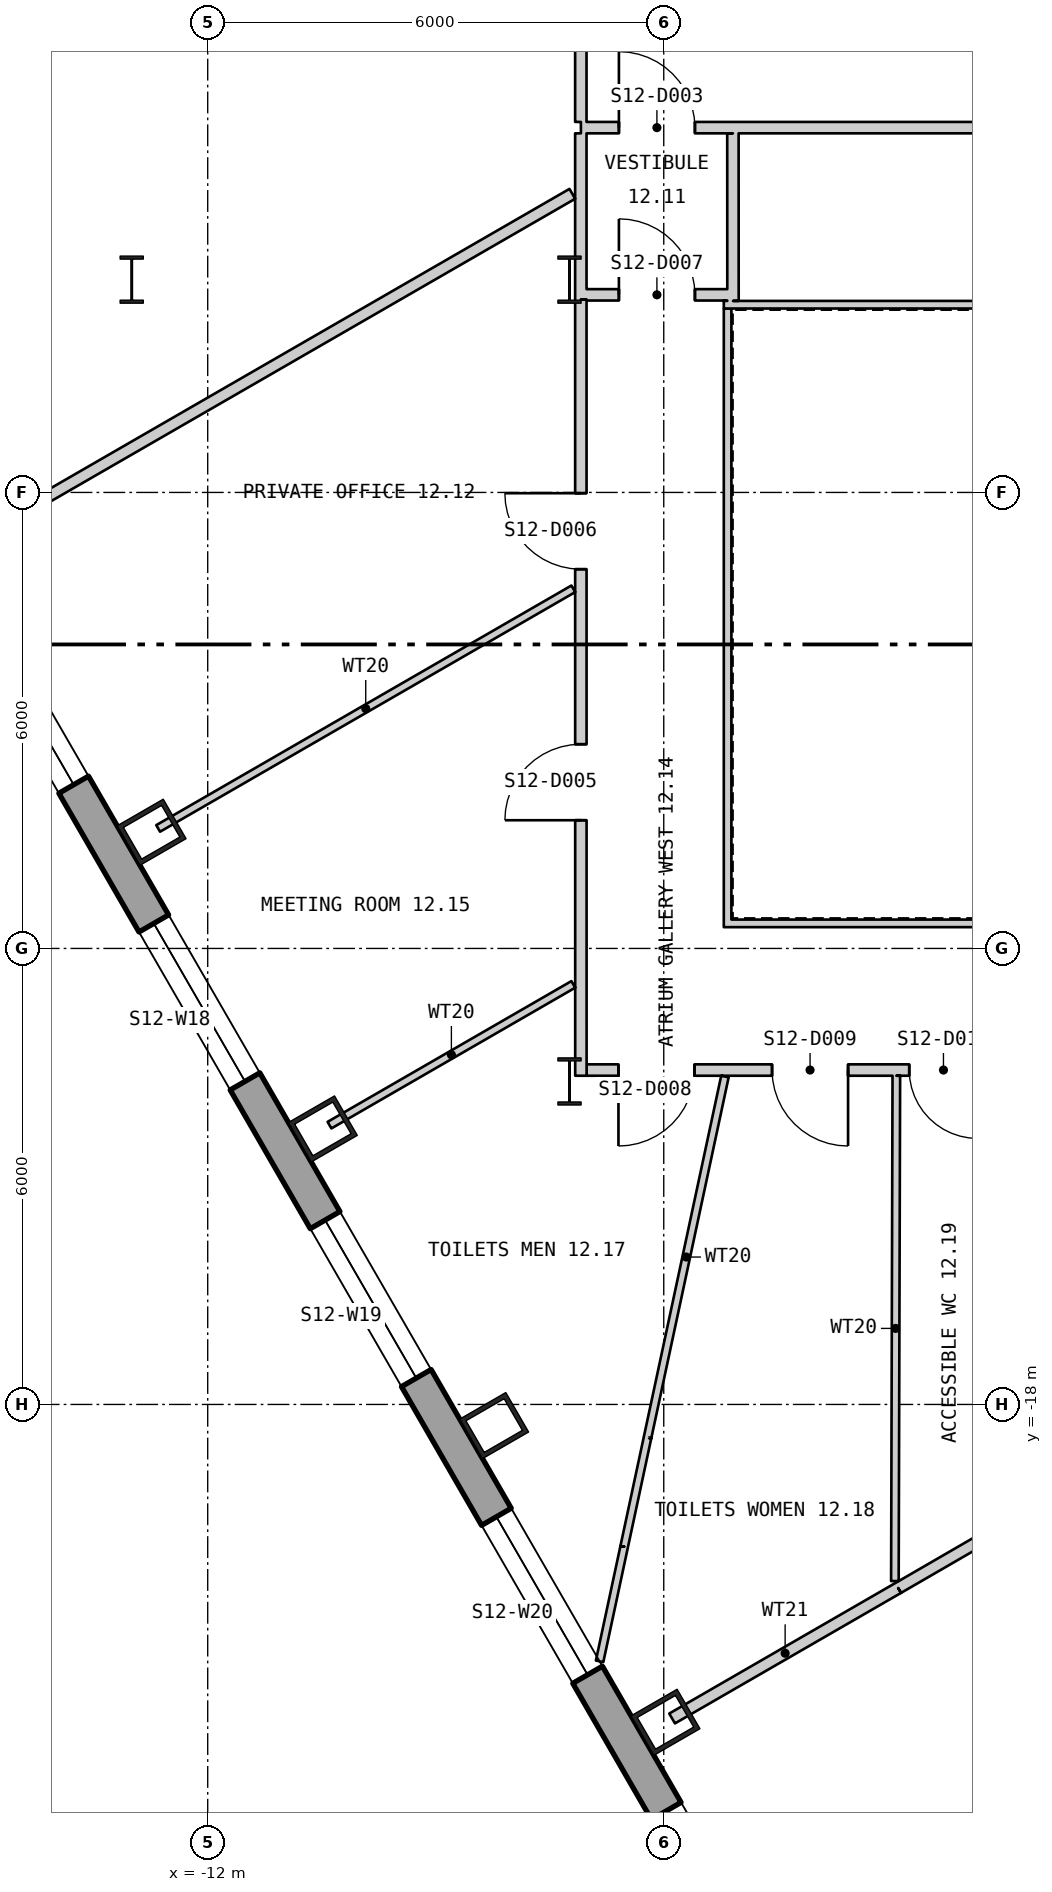
"""IFC4 building model, lengths in metres.
Left out: names, types, materials, properties, quantities, classifications, styles, units other than length and angle.
Written with IfcOpenShell. Run it as: python <this file> out.ifc"""

import sys

from ifc_helpers import new_model, si_unit, direction, frame, frame_2d, origin, origin_2d, place, context, subcontext, project, spatial, polyline, rectangle, hollow_rectangle, i_section, outline, extrude, element, fill, save


model = new_model("IFC4")
c1 = context("Model", 3, precision=1e-05, world=origin(), true_north=direction((0.0, 1.0)))
c2 = subcontext(c1, "Body", "Model", "MODEL_VIEW")
j1 = project(units=[si_unit("LENGTHUNIT", "METRE"), si_unit("PLANEANGLEUNIT", "RADIAN")], contexts=[c1])
p1 = place(None, origin())
s1 = spatial("IfcSite", under=j1, at=p1, CompositionType="ELEMENT")
p2 = place(p1, origin())
s2 = spatial("IfcBuilding", under=s1, at=p2, CompositionType="ELEMENT")
p3 = place(p2, frame((0.0, 0.0, 163.2)))
s3 = spatial("IfcBuildingStorey", under=s2, at=p3, CompositionType="ELEMENT", Elevation=163.2)
for number, where, z_axis, x_axis in (
    (1, (-12.738, -10.471, 0.0), (0.0, 0.0, 1.0), (0.5, -0.866, 0.0)),
    (2, (-10.485, -14.375, 0.0), (0.0, 0.0, 1.0), (0.5, -0.866, 0.0)),
    (3, (-8.231, -18.278, 0.0), (0.0, 0.0, 1.0), (0.5, -0.866, 0.0)),
    (4, (-5.977, -22.182, 0.0), (0.0, 0.0, 1.0), (0.5, -0.866, 0.0)),
):
    element("IfcColumn", number, at=place(p3, frame(where, z_axis=z_axis, x_axis=x_axis)), inside=s3, PredefinedType="COLUMN", context=c2, shape_type="SweptSolid", body=[
        extrude(hollow_rectangle(XDim=0.6, YDim=0.7, WallThickness=0.06, at=origin_2d()), origin(), (0.0, 0.0, 1.0), 3.9),
    ])
for number, where, z_axis, x_axis in (
    (5, (-7.24, -3.2, 0.0), (0.0, 0.0, 1.0), (1.0, 0.0, 0.0)),
    (6, (-7.24, -13.75, 0.0), (0.0, 0.0, 1.0), (1.0, 0.0, 0.0)),
    (7, (-13.0, -3.2, 0.0), (0.0, 0.0, 1.0), (1.0, 0.0, 0.0)),
):
    element("IfcColumn", number, at=place(p3, frame(where, z_axis=z_axis, x_axis=x_axis)), inside=s3, PredefinedType="COLUMN", context=c2, shape_type="SweptSolid", body=[
        extrude(i_section(OverallWidth=0.305, OverallDepth=0.62, WebThickness=0.021, FlangeThickness=0.04, at=origin_2d()), origin(), (0.0, 0.0, 1.0), 3.9),
    ])
p4 = place(p3, frame((-26.925, 12.951, -0.18), z_axis=(0.0, 0.0, 1.0), x_axis=(0.499999764979, -0.866025539474, 0.0)))
e8 = element("IfcWall", 8, at=p4, inside=s3, PredefinedType="SOLIDWALL", context=c2, shape_type="SweptSolid", body=[
    extrude(outline(polyline([(-0.13, -0.225), (45.87, -0.225), (45.61, 0.225), (0.13, 0.225), (-0.13, -0.225)])), origin(), (0.0, 0.0, 1.0), 3.68),
])
p5 = place(p4, frame((1.424, 0.0, 1.08)))
e9 = element("IfcOpeningElement", 9, at=p5, cuts=e8, PredefinedType="OPENING", context=c2, shape_type="SweptSolid", body=[
    extrude(rectangle(XDim=2.4, YDim=2.0, at=frame_2d((1.2, 1.0))), frame((0.0, 0.235, 0.0), z_axis=(0.0, -1.0, 0.0), x_axis=(1.0, 0.0, 0.0)), (0.0, 0.0, 1.0), 0.47),
])
p6 = place(p4, frame((5.893, 0.0, 1.08)))
e10 = element("IfcOpeningElement", 10, at=p6, cuts=e8, PredefinedType="OPENING", context=c2, shape_type="SweptSolid", body=[
    extrude(rectangle(XDim=2.4, YDim=2.0, at=frame_2d((1.2, 1.0))), frame((0.0, 0.235, 0.0), z_axis=(0.0, -1.0, 0.0), x_axis=(1.0, 0.0, 0.0)), (0.0, 0.0, 1.0), 0.47),
])
p7 = place(p4, frame((10.401, 0.0, 1.08)))
e11 = element("IfcOpeningElement", 11, at=p7, cuts=e8, PredefinedType="OPENING", context=c2, shape_type="SweptSolid", body=[
    extrude(rectangle(XDim=2.4, YDim=2.0, at=frame_2d((1.2, 1.0))), frame((0.0, 0.235, 0.0), z_axis=(0.0, -1.0, 0.0), x_axis=(1.0, 0.0, 0.0)), (0.0, 0.0, 1.0), 0.47),
])
p8 = place(p4, frame((14.909, 0.0, 1.08)))
e12 = element("IfcOpeningElement", 12, at=p8, cuts=e8, PredefinedType="OPENING", context=c2, shape_type="SweptSolid", body=[
    extrude(rectangle(XDim=2.4, YDim=2.0, at=frame_2d((1.2, 1.0))), frame((0.0, 0.235, 0.0), z_axis=(0.0, -1.0, 0.0), x_axis=(1.0, 0.0, 0.0)), (0.0, 0.0, 1.0), 0.47),
])
p9 = place(p4, frame((19.416, 0.0, 1.08)))
e13 = element("IfcOpeningElement", 13, at=p9, cuts=e8, PredefinedType="OPENING", context=c2, shape_type="SweptSolid", body=[
    extrude(rectangle(XDim=2.4, YDim=2.0, at=frame_2d((1.2, 1.0))), frame((0.0, 0.235, 0.0), z_axis=(0.0, -1.0, 0.0), x_axis=(1.0, 0.0, 0.0)), (0.0, 0.0, 1.0), 0.47),
])
p10 = place(p4, frame((23.924, 0.0, 1.08)))
e14 = element("IfcOpeningElement", 14, at=p10, cuts=e8, PredefinedType="OPENING", context=c2, shape_type="SweptSolid", body=[
    extrude(rectangle(XDim=2.4, YDim=2.0, at=frame_2d((1.2, 1.0))), frame((0.0, 0.235, 0.0), z_axis=(0.0, -1.0, 0.0), x_axis=(1.0, 0.0, 0.0)), (0.0, 0.0, 1.0), 0.47),
])
p11 = place(p4, frame((28.431, 0.0, 1.08)))
e15 = element("IfcOpeningElement", 15, at=p11, cuts=e8, PredefinedType="OPENING", context=c2, shape_type="SweptSolid", body=[
    extrude(rectangle(XDim=2.4, YDim=2.0, at=frame_2d((1.2, 1.0))), frame((0.0, 0.235, 0.0), z_axis=(0.0, -1.0, 0.0), x_axis=(1.0, 0.0, 0.0)), (0.0, 0.0, 1.0), 0.47),
])
p12 = place(p4, frame((32.939, 0.0, 1.08)))
e16 = element("IfcOpeningElement", 16, at=p12, cuts=e8, PredefinedType="OPENING", context=c2, shape_type="SweptSolid", body=[
    extrude(rectangle(XDim=2.4, YDim=2.0, at=frame_2d((1.2, 1.0))), frame((0.0, 0.235, 0.0), z_axis=(0.0, -1.0, 0.0), x_axis=(1.0, 0.0, 0.0)), (0.0, 0.0, 1.0), 0.47),
])
p13 = place(p4, frame((37.447, 0.0, 1.08)))
e17 = element("IfcOpeningElement", 17, at=p13, cuts=e8, PredefinedType="OPENING", context=c2, shape_type="SweptSolid", body=[
    extrude(rectangle(XDim=2.4, YDim=2.0, at=frame_2d((1.2, 1.0))), frame((0.0, 0.235, 0.0), z_axis=(0.0, -1.0, 0.0), x_axis=(1.0, 0.0, 0.0)), (0.0, 0.0, 1.0), 0.47),
])
p14 = place(p4, frame((41.916, 0.0, 1.08)))
e18 = element("IfcOpeningElement", 18, at=p14, cuts=e8, PredefinedType="OPENING", context=c2, shape_type="SweptSolid", body=[
    extrude(rectangle(XDim=2.4, YDim=2.0, at=frame_2d((1.2, 1.0))), frame((0.0, 0.235, 0.0), z_axis=(0.0, -1.0, 0.0), x_axis=(1.0, 0.0, 0.0)), (0.0, 0.0, 1.0), 0.47),
])
for number, where, z_axis, x_axis in (
    (19, (-5.21, -11.67, 0.0), (0.0, 0.0, 1.0), (1.0, 0.0, 0.0)),
    (20, (5.21, -3.53, 0.0), (0.0, 0.0, 1.0), (-1.0, 0.0, 0.0)),
):
    element("IfcWall", number, at=place(p3, frame(where, z_axis=z_axis, x_axis=x_axis)), inside=s3, PredefinedType="PARTITIONING", context=c2, shape_type="SweptSolid", body=[
        extrude(rectangle(XDim=10.42, YDim=0.1, at=frame_2d((5.21, 0.0))), origin(), (0.0, 0.0, 1.0), 3.7),
    ])
p15 = place(p3, frame((-5.16, -3.58, 0.0), z_axis=(0.0, 0.0, 1.0), x_axis=(0.0, -1.0, 0.0)))
e21 = element("IfcWall", 21, at=p15, inside=s3, PredefinedType="PARTITIONING", context=c2, shape_type="SweptSolid", body=[
    extrude(rectangle(XDim=8.04, YDim=0.1, at=frame_2d((4.02, 0.0))), origin(), (0.0, 0.0, 1.0), 3.7),
])
p16 = place(p3, frame((-14.906, -6.516, 0.0), z_axis=(0.0, 0.0, 1.0), x_axis=(0.866138783521, 0.499803569096, 0.0)))
e22 = element("IfcWall", 22, at=p16, inside=s3, PredefinedType="PARTITIONING", context=c2, shape_type="SweptSolid", body=[
    extrude(rectangle(XDim=8.893, YDim=0.15, at=frame_2d((4.447, 0.0))), origin(), (0.0, 0.0, 1.0), 3.7),
])
p17 = place(p3, frame((-12.652, -10.421, 0.0), z_axis=(0.0, 0.0, 1.0), x_axis=(0.866058850386, 0.499942064311, 0.0)))
e23 = element("IfcWall", 23, at=p17, inside=s3, PredefinedType="PARTITIONING", context=c2, shape_type="SweptSolid", body=[
    extrude(rectangle(XDim=6.307, YDim=0.1, at=frame_2d((3.153, 0.0))), origin(), (0.0, 0.0, 1.0), 3.7),
])
p18 = place(p3, frame((-10.398, -14.325, 0.0), z_axis=(0.0, 0.0, 1.0), x_axis=(0.866041729639, 0.499971721724, 0.0)))
e24 = element("IfcWall", 24, at=p18, inside=s3, PredefinedType="PARTITIONING", context=c2, shape_type="SweptSolid", body=[
    extrude(rectangle(XDim=3.704, YDim=0.1, at=frame_2d((1.852, 0.0))), origin(), (0.0, 0.0, 1.0), 3.7),
])
p19 = place(p3, frame((-7.091, -1.125, 0.0), z_axis=(0.0, 0.0, 1.0), x_axis=(0.0, 1.0, 0.0)))
e25 = element("IfcWall", 25, at=p19, inside=s3, PredefinedType="PARTITIONING", context=c2, shape_type="SweptSolid", body=[
    extrude(rectangle(XDim=1.4, YDim=0.15, at=frame_2d((0.7, 0.0))), origin(), (0.0, 0.0, 1.0), 3.7),
])
p20 = place(p3, frame((-7.09, -1.2, 0.0), z_axis=(0.0, 0.0, 1.0), x_axis=(1.0, 0.0, 0.0)))
e26 = element("IfcWall", 26, at=p20, inside=s3, PredefinedType="PARTITIONING", context=c2, shape_type="SweptSolid", body=[
    extrude(rectangle(XDim=14.255, YDim=0.15, at=frame_2d((7.128, 0.0))), origin(), (0.0, 0.0, 1.0), 3.7),
])
p21 = place(p20, frame((0.5, 0.0, 0.0)))
e27 = element("IfcOpeningElement", 27, at=p21, cuts=e26, PredefinedType="OPENING", context=c2, shape_type="SweptSolid", body=[
    extrude(rectangle(XDim=1.0, YDim=2.1, at=frame_2d((0.5, 1.05))), frame((0.0, 0.085, 0.0), z_axis=(0.0, -1.0, 0.0), x_axis=(1.0, 0.0, 0.0)), (0.0, 0.0, 1.0), 0.17),
])
p22 = place(p20, frame((7.338, 0.0, 0.0)))
e28 = element("IfcOpeningElement", 28, at=p22, cuts=e26, PredefinedType="OPENING", context=c2, shape_type="SweptSolid", body=[
    extrude(rectangle(XDim=1.0, YDim=2.1, at=frame_2d((0.5, 1.05))), frame((0.0, 0.085, 0.0), z_axis=(0.0, -1.0, 0.0), x_axis=(1.0, 0.0, 0.0)), (0.0, 0.0, 1.0), 0.17),
])
p23 = place(p3, frame((-7.09, -13.675, 0.0), z_axis=(0.0, 0.0, 1.0), x_axis=(-7.8316201e-05, 0.999999996933, 0.0)))
e29 = element("IfcWall", 29, at=p23, inside=s3, PredefinedType="PARTITIONING", context=c2, shape_type="SweptSolid", body=[
    extrude(rectangle(XDim=10.215, YDim=0.15, at=frame_2d((5.107, 0.0))), origin(), (0.0, 0.0, 1.0), 3.11),
])
p24 = place(p23, frame((3.362, 0.0, 0.0)))
e30 = element("IfcOpeningElement", 30, at=p24, cuts=e29, PredefinedType="OPENING", context=c2, shape_type="SweptSolid", body=[
    extrude(rectangle(XDim=1.0, YDim=2.1, at=frame_2d((0.5, 1.05))), frame((0.0, 0.085, 0.0), z_axis=(0.0, -1.0, 0.0), x_axis=(1.0, 0.0, 0.0)), (0.0, 0.0, 1.0), 0.17),
])
p25 = place(p23, frame((6.665, 0.0, 0.0)))
e31 = element("IfcOpeningElement", 31, at=p25, cuts=e29, PredefinedType="OPENING", context=c2, shape_type="SweptSolid", body=[
    extrude(rectangle(XDim=1.0, YDim=2.1, at=frame_2d((0.5, 1.05))), frame((0.0, 0.085, 0.0), z_axis=(0.0, -1.0, 0.0), x_axis=(1.0, 0.0, 0.0)), (0.0, 0.0, 1.0), 0.17),
])
p26 = place(p3, frame((-7.091, -3.46, 0.0), z_axis=(0.0, 0.0, 1.0), x_axis=(-9.153318e-05, 0.999999995811, 0.0)))
e32 = element("IfcWall", 32, at=p26, inside=s3, PredefinedType="PARTITIONING", context=c2, shape_type="SweptSolid", body=[
    extrude(rectangle(XDim=2.185, YDim=0.15, at=frame_2d((1.093, 0.0))), origin(), (0.0, 0.0, 1.0), 3.7),
])
p27 = place(p3, frame((-7.016, -3.4, 0.0), z_axis=(0.0, 0.0, 1.0), x_axis=(1.0, 0.0, 0.0)))
e33 = element("IfcWall", 33, at=p27, inside=s3, PredefinedType="PARTITIONING", context=c2, shape_type="SweptSolid", body=[
    extrude(rectangle(XDim=1.852, YDim=0.15, at=frame_2d((0.926, 0.0))), origin(), (0.0, 0.0, 1.0), 3.7),
])
p28 = place(p27, frame((0.426, 0.0, 0.0)))
e34 = element("IfcOpeningElement", 34, at=p28, cuts=e33, PredefinedType="OPENING", context=c2, shape_type="SweptSolid", body=[
    extrude(rectangle(XDim=1.0, YDim=2.1, at=frame_2d((0.5, 1.05))), frame((0.0, 0.085, 0.0), z_axis=(0.0, -1.0, 0.0), x_axis=(1.0, 0.0, 0.0)), (0.0, 0.0, 1.0), 0.17),
])
p29 = place(p3, frame((-7.015, -13.6, 0.0), z_axis=(0.0, 0.0, 1.0), x_axis=(1.0, 0.0, 0.0)))
e35 = element("IfcWall", 35, at=p29, inside=s3, PredefinedType="PARTITIONING", context=c2, shape_type="SweptSolid", body=[
    extrude(rectangle(XDim=5.315, YDim=0.15, at=frame_2d((2.658, 0.0))), origin(), (0.0, 0.0, 1.0), 2.886),
])
p30 = place(p29, frame((0.419, 0.0, 0.0)))
e36 = element("IfcOpeningElement", 36, at=p30, cuts=e35, PredefinedType="OPENING", context=c2, shape_type="SweptSolid", body=[
    extrude(rectangle(XDim=1.0, YDim=2.1, at=frame_2d((0.5, 1.05))), frame((0.0, 0.085, 0.0), z_axis=(0.0, -1.0, 0.0), x_axis=(1.0, 0.0, 0.0)), (0.0, 0.0, 1.0), 0.17),
])
p31 = place(p29, frame((2.44, 0.0, 0.0)))
e37 = element("IfcOpeningElement", 37, at=p31, cuts=e35, PredefinedType="OPENING", context=c2, shape_type="SweptSolid", body=[
    extrude(rectangle(XDim=1.0, YDim=2.1, at=frame_2d((0.5, 1.05))), frame((0.0, 0.085, 0.0), z_axis=(0.0, -1.0, 0.0), x_axis=(1.0, 0.0, 0.0)), (0.0, 0.0, 1.0), 0.17),
])
p32 = place(p29, frame((4.245, 0.0, 0.0)))
e38 = element("IfcOpeningElement", 38, at=p32, cuts=e35, PredefinedType="OPENING", context=c2, shape_type="SweptSolid", body=[
    extrude(rectangle(XDim=0.9, YDim=2.1, at=frame_2d((0.45, 1.05))), frame((0.0, 0.085, 0.0), z_axis=(0.0, -1.0, 0.0), x_axis=(1.0, 0.0, 0.0)), (0.0, 0.0, 1.0), 0.17),
])
p33 = place(p3, frame((-6.844, -21.38, 0.0), z_axis=(0.0, 0.0, 1.0), x_axis=(0.209529088731, 0.977802414077, 0.0)))
e39 = element("IfcWall", 39, at=p33, inside=s3, PredefinedType="PARTITIONING", context=c2, shape_type="SweptSolid", body=[
    extrude(rectangle(XDim=1.542, YDim=0.1, at=frame_2d((0.771, 0.0))), origin(), (0.0, 0.0, 1.0), 3.7),
])
p34 = place(p3, frame((-6.521, -19.872, 0.0), z_axis=(0.0, 0.0, 1.0), x_axis=(0.209543036328, 0.977799425203, 0.0)))
e40 = element("IfcWall", 40, at=p34, inside=s3, PredefinedType="PARTITIONING", context=c2, shape_type="SweptSolid", body=[
    extrude(rectangle(XDim=1.469, YDim=0.1, at=frame_2d((0.735, 0.0))), origin(), (0.0, 0.0, 1.0), 3.15),
])
p35 = place(p3, frame((-6.213, -18.436, 0.0), z_axis=(0.0, 0.0, 1.0), x_axis=(0.209538927619, 0.977800305692, 0.0)))
e41 = element("IfcWall", 41, at=p35, inside=s3, PredefinedType="PARTITIONING", context=c2, shape_type="SweptSolid", body=[
    extrude(rectangle(XDim=4.859, YDim=0.1, at=frame_2d((2.429, 0.0))), origin(), (0.0, 0.0, 1.0), 3.7),
])
p36 = place(p3, frame((-5.89, -22.132, 0.0), z_axis=(0.0, 0.0, 1.0), x_axis=(0.866030409726, 0.499991329354, 0.0)))
e42 = element("IfcWall", 42, at=p36, inside=s3, PredefinedType="PARTITIONING", context=c2, shape_type="SweptSolid", body=[
    extrude(rectangle(XDim=3.434, YDim=0.15, at=frame_2d((1.717, 0.0))), origin(), (0.0, 0.0, 1.0), 3.7),
])
p37 = place(p3, frame((-5.089, -3.48, 0.0), z_axis=(0.0, 0.0, 1.0), x_axis=(-0.000453514693, 0.999999897162, 0.0)))
e43 = element("IfcWall", 43, at=p37, inside=s3, PredefinedType="PARTITIONING", context=c2, shape_type="SweptSolid", body=[
    extrude(rectangle(XDim=2.205, YDim=0.15, at=frame_2d((1.103, 0.0))), origin(), (0.0, 0.0, 1.0), 3.7),
])
p38 = place(p3, frame((-2.959, -20.324, 0.0), z_axis=(0.0, 0.0, 1.0), x_axis=(0.0028575609, 0.999995917165, 0.0)))
e44 = element("IfcWall", 44, at=p38, inside=s3, PredefinedType="PARTITIONING", context=c2, shape_type="SweptSolid", body=[
    extrude(rectangle(XDim=6.649, YDim=0.1, at=frame_2d((3.325, 0.0))), origin(), (0.0, 0.0, 1.0), 3.7),
])
p39 = place(p3, frame((-2.916, -20.415, 0.0), z_axis=(0.0, 0.0, 1.0), x_axis=(0.865426285481, 0.501036270542, 0.0)))
e45 = element("IfcWall", 45, at=p39, inside=s3, PredefinedType="PARTITIONING", context=c2, shape_type="SweptSolid", body=[
    extrude(rectangle(XDim=1.361, YDim=0.15, at=frame_2d((0.681, 0.0))), origin(), (0.0, 0.0, 1.0), 3.7),
])
p40 = place(p10, origin())
e46 = element("IfcWindow", 46, at=p40, inside=s3, PartitioningType="SINGLE_PANEL", PredefinedType="WINDOW", context=c2, shape_type="SweptSolid", body=[
    extrude(rectangle(XDim=2.4, YDim=2.0, at=frame_2d((1.2, 1.0))), frame((0.0, 0.105, 0.0), z_axis=(0.0, -1.0, 0.0), x_axis=(1.0, 0.0, 0.0)), (0.0, 0.0, 1.0), 0.06),
])
fill(e14, e46)
p41 = place(p11, origin())
e47 = element("IfcWindow", 47, at=p41, inside=s3, PartitioningType="SINGLE_PANEL", PredefinedType="WINDOW", context=c2, shape_type="SweptSolid", body=[
    extrude(rectangle(XDim=2.4, YDim=2.0, at=frame_2d((1.2, 1.0))), frame((0.0, 0.105, 0.0), z_axis=(0.0, -1.0, 0.0), x_axis=(1.0, 0.0, 0.0)), (0.0, 0.0, 1.0), 0.06),
])
fill(e15, e47)
p42 = place(p12, origin())
e48 = element("IfcWindow", 48, at=p42, inside=s3, PartitioningType="SINGLE_PANEL", PredefinedType="WINDOW", context=c2, shape_type="SweptSolid", body=[
    extrude(rectangle(XDim=2.4, YDim=2.0, at=frame_2d((1.2, 1.0))), frame((0.0, 0.105, 0.0), z_axis=(0.0, -1.0, 0.0), x_axis=(1.0, 0.0, 0.0)), (0.0, 0.0, 1.0), 0.06),
])
fill(e16, e48)
p43 = place(p13, origin())
e49 = element("IfcWindow", 49, at=p43, inside=s3, PartitioningType="SINGLE_PANEL", PredefinedType="WINDOW", context=c2, shape_type="SweptSolid", body=[
    extrude(rectangle(XDim=2.4, YDim=2.0, at=frame_2d((1.2, 1.0))), frame((0.0, 0.105, 0.0), z_axis=(0.0, -1.0, 0.0), x_axis=(1.0, 0.0, 0.0)), (0.0, 0.0, 1.0), 0.06),
])
fill(e17, e49)
p44 = place(p14, origin())
e50 = element("IfcWindow", 50, at=p44, inside=s3, PartitioningType="SINGLE_PANEL", PredefinedType="WINDOW", context=c2, shape_type="SweptSolid", body=[
    extrude(rectangle(XDim=2.4, YDim=2.0, at=frame_2d((1.2, 1.0))), frame((0.0, 0.105, 0.0), z_axis=(0.0, -1.0, 0.0), x_axis=(1.0, 0.0, 0.0)), (0.0, 0.0, 1.0), 0.06),
])
fill(e18, e50)
p45 = place(p21, origin())
e51 = element("IfcDoor", 51, at=p45, inside=s3, OperationType="SINGLE_SWING_RIGHT", PredefinedType="DOOR", context=c2, shape_type="SweptSolid", body=[
    extrude(rectangle(XDim=1.0, YDim=2.1, at=frame_2d((0.5, 1.05))), frame((0.0, 0.025, 0.0), z_axis=(0.0, -1.0, 0.0), x_axis=(1.0, 0.0, 0.0)), (0.0, 0.0, 1.0), 0.05),
])
fill(e27, e51)
p46 = place(p24, origin())
e52 = element("IfcDoor", 52, at=p46, inside=s3, OperationType="SINGLE_SWING_RIGHT", PredefinedType="DOOR", context=c2, shape_type="SweptSolid", body=[
    extrude(rectangle(XDim=1.0, YDim=2.1, at=frame_2d((0.5, 1.05))), frame((0.0, 0.025, 0.0), z_axis=(0.0, -1.0, 0.0), x_axis=(1.0, 0.0, 0.0)), (0.0, 0.0, 1.0), 0.05),
])
fill(e30, e52)
p47 = place(p25, origin())
e53 = element("IfcDoor", 53, at=p47, inside=s3, OperationType="SINGLE_SWING_LEFT", PredefinedType="DOOR", context=c2, shape_type="SweptSolid", body=[
    extrude(rectangle(XDim=1.0, YDim=2.1, at=frame_2d((0.5, 1.05))), frame((0.0, 0.025, 0.0), z_axis=(0.0, -1.0, 0.0), x_axis=(1.0, 0.0, 0.0)), (0.0, 0.0, 1.0), 0.05),
])
fill(e31, e53)
p48 = place(p28, origin())
e54 = element("IfcDoor", 54, at=p48, inside=s3, OperationType="SINGLE_SWING_RIGHT", PredefinedType="DOOR", context=c2, shape_type="SweptSolid", body=[
    extrude(rectangle(XDim=1.0, YDim=2.1, at=frame_2d((0.5, 1.05))), frame((0.0, 0.025, 0.0), z_axis=(0.0, -1.0, 0.0), x_axis=(1.0, 0.0, 0.0)), (0.0, 0.0, 1.0), 0.05),
])
fill(e34, e54)
p49 = place(p30, origin())
e55 = element("IfcDoor", 55, at=p49, inside=s3, OperationType="SINGLE_SWING_LEFT", PredefinedType="DOOR", context=c2, shape_type="SweptSolid", body=[
    extrude(rectangle(XDim=1.0, YDim=2.1, at=frame_2d((0.5, 1.05))), frame((0.0, 0.025, 0.0), z_axis=(0.0, -1.0, 0.0), x_axis=(1.0, 0.0, 0.0)), (0.0, 0.0, 1.0), 0.05),
])
fill(e36, e55)
p50 = place(p31, origin())
e56 = element("IfcDoor", 56, at=p50, inside=s3, OperationType="SINGLE_SWING_RIGHT", PredefinedType="DOOR", context=c2, shape_type="SweptSolid", body=[
    extrude(rectangle(XDim=1.0, YDim=2.1, at=frame_2d((0.5, 1.05))), frame((0.0, 0.025, 0.0), z_axis=(0.0, -1.0, 0.0), x_axis=(1.0, 0.0, 0.0)), (0.0, 0.0, 1.0), 0.05),
])
fill(e37, e56)
p51 = place(p32, origin())
e57 = element("IfcDoor", 57, at=p51, inside=s3, OperationType="SINGLE_SWING_RIGHT", PredefinedType="DOOR", context=c2, shape_type="SweptSolid", body=[
    extrude(rectangle(XDim=0.9, YDim=2.1, at=frame_2d((0.45, 1.05))), frame((0.0, 0.025, 0.0), z_axis=(0.0, -1.0, 0.0), x_axis=(1.0, 0.0, 0.0)), (0.0, 0.0, 1.0), 0.05),
])
fill(e38, e57)
save(model, sys.argv[1])
